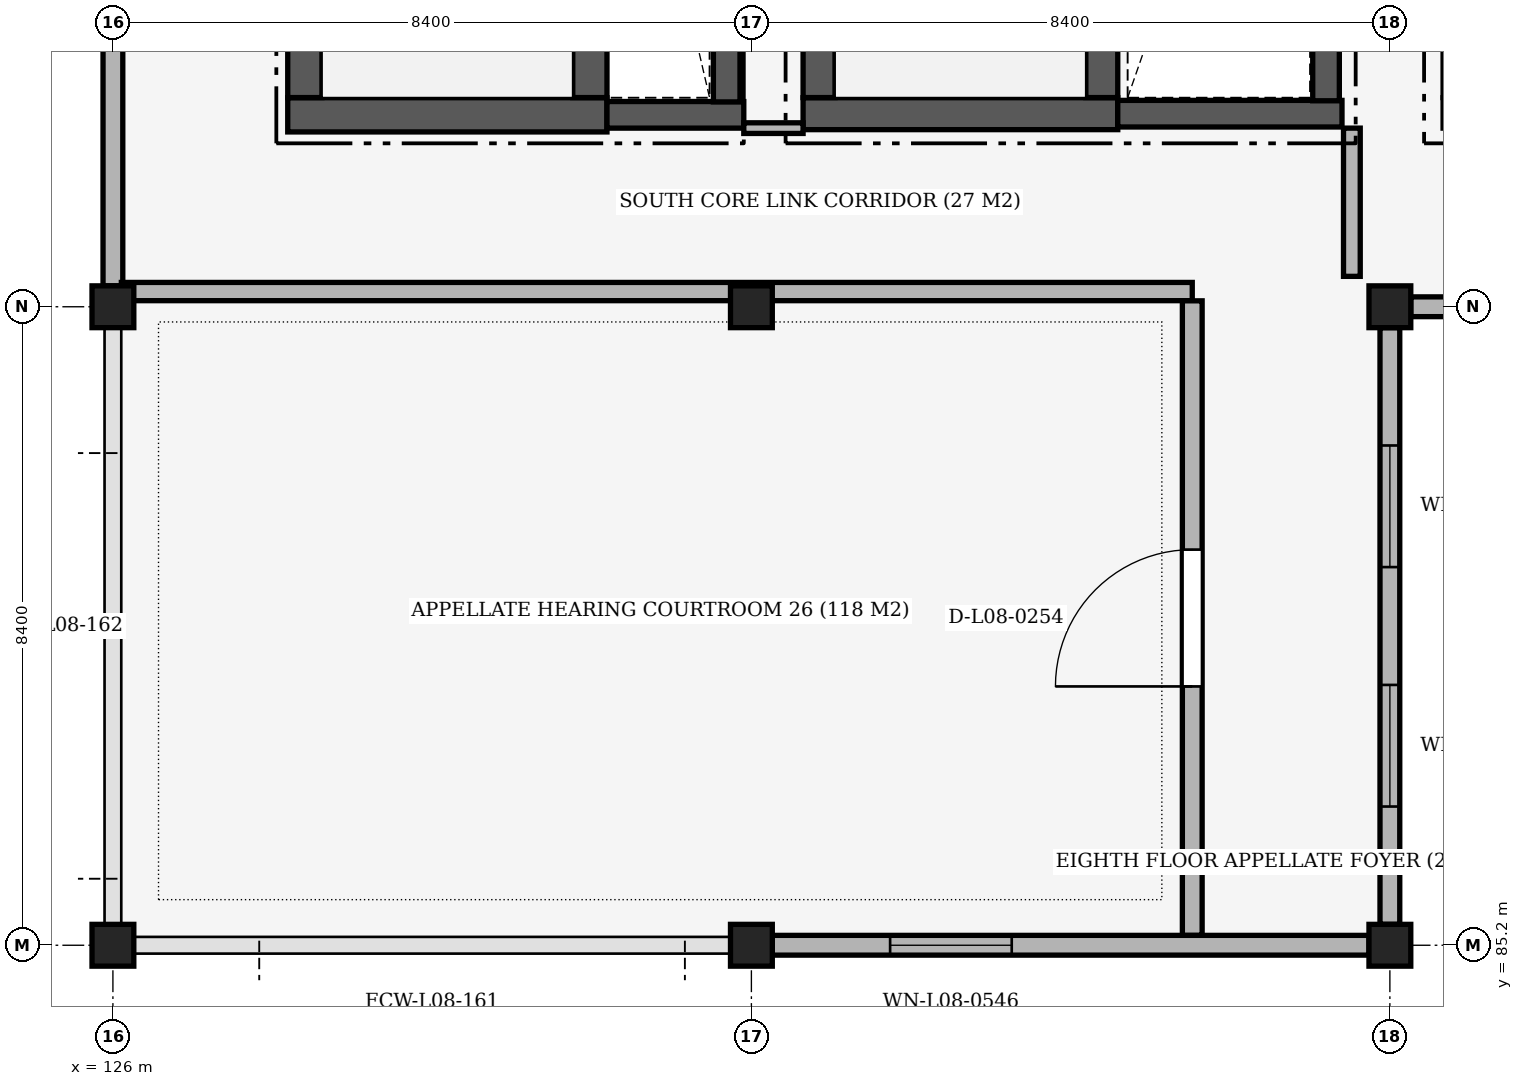
"""IFC4 building model, lengths in metres.
Left out: names, types, materials, properties, quantities, classifications, styles, units other than length and angle.
Written with IfcOpenShell. Run it as: python <this file> out.ifc"""

import sys

from ifc_helpers import new_model, si_unit, direction, frame, frame_2d, origin, origin_2d, place, context, subcontext, project, spatial, rectangle, extrude, element, fill, save


model = new_model("IFC4")
c1 = context("Model", 3, precision=1e-05, world=origin(), true_north=direction((0.0, 1.0)))
c2 = subcontext(c1, "Body", "Model", "MODEL_VIEW")
j1 = project(units=[si_unit("LENGTHUNIT", "METRE"), si_unit("PLANEANGLEUNIT", "RADIAN")], contexts=[c1])
p1 = place(None, origin())
s1 = spatial("IfcSite", under=j1, at=p1, CompositionType="ELEMENT")
p2 = place(p1, origin())
s2 = spatial("IfcBuilding", under=s1, at=p2, CompositionType="ELEMENT")
p3 = place(p2, frame((0.0, 0.0, 37.8)))
s3 = spatial("IfcBuildingStorey", under=s2, at=p3, CompositionType="ELEMENT", Elevation=37.8)
for number, where, z_axis, x_axis in (
    (1, (126.0, 85.2, 0.0), (0.0, 0.0, 1.0), (1.0, 0.0, 0.0)),
    (2, (126.0, 93.6, 0.0), (0.0, 0.0, 1.0), (1.0, 0.0, 0.0)),
    (3, (134.4, 85.2, 0.0), (0.0, 0.0, 1.0), (1.0, 0.0, 0.0)),
    (4, (134.4, 93.6, 0.0), (0.0, 0.0, 1.0), (1.0, 0.0, 0.0)),
    (5, (142.8, 85.2, 0.0), (0.0, 0.0, 1.0), (1.0, 0.0, 0.0)),
    (6, (142.8, 93.6, 0.0), (0.0, 0.0, 1.0), (1.0, 0.0, 0.0)),
):
    element("IfcColumn", number, at=place(p3, frame(where, z_axis=z_axis, x_axis=x_axis)), inside=s3, PredefinedType="COLUMN", context=c2, shape_type="SweptSolid", body=[
        extrude(rectangle(XDim=0.55, YDim=0.55, at=origin_2d()), origin(), (0.0, 0.0, 1.0), 4.2),
    ])
p4 = place(p3, frame((142.525, 85.2, 0.0), z_axis=(0.0, 0.0, 1.0), x_axis=(-1.0, 0.0, 0.0)))
e7 = element("IfcWall", 7, at=p4, inside=s3, PredefinedType="SOLIDWALL", context=c2, shape_type="SweptSolid", body=[
    extrude(rectangle(XDim=7.85, YDim=0.26, at=frame_2d((3.925, 0.0))), origin(), (0.0, 0.0, 1.0), 3.26),
])
p5 = place(p4, frame((4.7, 0.0, 1.05)))
e8 = element("IfcOpeningElement", 8, at=p5, cuts=e7, PredefinedType="OPENING", context=c2, shape_type="SweptSolid", body=[
    extrude(rectangle(XDim=1.6, YDim=1.8, at=frame_2d((0.8, 0.9))), frame((0.0, 0.145, 0.0), z_axis=(0.0, -1.0, 0.0), x_axis=(1.0, 0.0, 0.0)), (0.0, 0.0, 1.0), 0.29),
])
p6 = place(p3, frame((126.0, 93.875, 0.0), z_axis=(0.0, 0.0, 1.0), x_axis=(0.0, 1.0, 0.0)))
e9 = element("IfcWall", 9, at=p6, inside=s3, PredefinedType="SOLIDWALL", context=c2, shape_type="SweptSolid", body=[
    extrude(rectangle(XDim=5.425, YDim=0.26, at=frame_2d((2.712, 0.0))), origin(), (0.0, 0.0, 1.0), 3.41),
])
p7 = place(p3, frame((150.925, 93.6, 0.0), z_axis=(0.0, 0.0, 1.0), x_axis=(-1.0, 0.0, 0.0)))
e10 = element("IfcWall", 10, at=p7, inside=s3, PredefinedType="SOLIDWALL", context=c2, shape_type="SweptSolid", body=[
    extrude(rectangle(XDim=7.85, YDim=0.26, at=frame_2d((3.925, 0.0))), origin(), (0.0, 0.0, 1.0), 3.26),
])
p8 = place(p7, frame((1.55, 0.0, 1.05)))
e11 = element("IfcOpeningElement", 11, at=p8, cuts=e10, PredefinedType="OPENING", context=c2, shape_type="SweptSolid", body=[
    extrude(rectangle(XDim=1.6, YDim=1.8, at=frame_2d((0.8, 0.9))), frame((0.0, 0.145, 0.0), z_axis=(0.0, -1.0, 0.0), x_axis=(1.0, 0.0, 0.0)), (0.0, 0.0, 1.0), 0.29),
])
p9 = place(p7, frame((4.7, 0.0, 1.05)))
e12 = element("IfcOpeningElement", 12, at=p9, cuts=e10, PredefinedType="OPENING", context=c2, shape_type="SweptSolid", body=[
    extrude(rectangle(XDim=1.6, YDim=1.8, at=frame_2d((0.8, 0.9))), frame((0.0, 0.145, 0.0), z_axis=(0.0, -1.0, 0.0), x_axis=(1.0, 0.0, 0.0)), (0.0, 0.0, 1.0), 0.29),
])
p10 = place(p3, frame((142.8, 93.325, 0.0), z_axis=(0.0, 0.0, 1.0), x_axis=(0.0, -1.0, 0.0)))
e13 = element("IfcWall", 13, at=p10, inside=s3, PredefinedType="SOLIDWALL", context=c2, shape_type="SweptSolid", body=[
    extrude(rectangle(XDim=7.85, YDim=0.26, at=frame_2d((3.925, 0.0))), origin(), (0.0, 0.0, 1.0), 3.26),
])
p11 = place(p10, frame((1.55, 0.0, 1.05)))
e14 = element("IfcOpeningElement", 14, at=p11, cuts=e13, PredefinedType="OPENING", context=c2, shape_type="SweptSolid", body=[
    extrude(rectangle(XDim=1.6, YDim=1.8, at=frame_2d((0.8, 0.9))), frame((0.0, 0.145, 0.0), z_axis=(0.0, -1.0, 0.0), x_axis=(1.0, 0.0, 0.0)), (0.0, 0.0, 1.0), 0.29),
])
p12 = place(p10, frame((4.7, 0.0, 1.05)))
e15 = element("IfcOpeningElement", 15, at=p12, cuts=e13, PredefinedType="OPENING", context=c2, shape_type="SweptSolid", body=[
    extrude(rectangle(XDim=1.6, YDim=1.8, at=frame_2d((0.8, 0.9))), frame((0.0, 0.145, 0.0), z_axis=(0.0, -1.0, 0.0), x_axis=(1.0, 0.0, 0.0)), (0.0, 0.0, 1.0), 0.29),
])
p13 = place(p3, frame((128.3, 96.125, 0.0), z_axis=(0.0, 0.0, 1.0), x_axis=(1.0, 0.0, 0.0)))
e16 = element("IfcWall", 16, at=p13, inside=s3, PredefinedType="SHEAR", context=c2, shape_type="SweptSolid", body=[
    extrude(rectangle(XDim=4.2, YDim=0.45, at=frame_2d((2.1, 0.0))), origin(), (0.0, 0.0, 1.0), 3.96),
])
for number, where, z_axis, x_axis in (
    (17, (128.525, 96.352, 0.0), (0.0, 0.0, 1.0), (0.0, 1.0, 0.0)),
    (18, (132.275, 96.352, 0.0), (0.0, 0.0, 1.0), (0.0, 1.0, 0.0)),
):
    element("IfcWall", number, at=place(p3, frame(where, z_axis=z_axis, x_axis=x_axis)), inside=s3, PredefinedType="SHEAR", context=c2, shape_type="SweptSolid", body=[
        extrude(rectangle(XDim=6.896, YDim=0.45, at=frame_2d((3.448, 0.0))), origin(), (0.0, 0.0, 1.0), 3.96),
    ])
p14 = place(p3, frame((132.5, 96.125, 0.0), z_axis=(0.0, 0.0, 1.0), x_axis=(1.0, 0.0, 0.0)))
e19 = element("IfcWall", 19, at=p14, inside=s3, PredefinedType="SHEAR", context=c2, shape_type="SweptSolid", body=[
    extrude(rectangle(XDim=1.8, YDim=0.35, at=frame_2d((0.9, 0.0))), origin(), (0.0, 0.0, 1.0), 3.96),
])
p15 = place(p3, frame((134.075, 96.295, 0.0), z_axis=(0.0, 0.0, 1.0), x_axis=(0.0, 1.0, 0.0)))
e20 = element("IfcWall", 20, at=p15, inside=s3, PredefinedType="SHEAR", context=c2, shape_type="SweptSolid", body=[
    extrude(rectangle(XDim=7.212, YDim=0.35, at=frame_2d((3.606, 0.0))), origin(), (0.0, 0.0, 1.0), 3.96),
])
p16 = place(p3, frame((135.08, 96.14, 0.0), z_axis=(0.0, 0.0, 1.0), x_axis=(1.0, 0.0, 0.0)))
e21 = element("IfcWall", 21, at=p16, inside=s3, PredefinedType="SHEAR", context=c2, shape_type="SweptSolid", body=[
    extrude(rectangle(XDim=4.14, YDim=0.42, at=frame_2d((2.07, 0.0))), origin(), (0.0, 0.0, 1.0), 3.96),
])
for number, where, z_axis, x_axis in (
    (22, (135.29, 96.352, 0.0), (0.0, 0.0, 1.0), (0.0, 1.0, 0.0)),
    (23, (139.01, 96.352, 0.0), (0.0, 0.0, 1.0), (0.0, 1.0, 0.0)),
):
    element("IfcWall", number, at=place(p3, frame(where, z_axis=z_axis, x_axis=x_axis)), inside=s3, PredefinedType="SHEAR", context=c2, shape_type="SweptSolid", body=[
        extrude(rectangle(XDim=6.896, YDim=0.42, at=frame_2d((3.448, 0.0))), origin(), (0.0, 0.0, 1.0), 3.96),
    ])
p17 = place(p3, frame((139.22, 96.14, 0.0), z_axis=(0.0, 0.0, 1.0), x_axis=(1.0, 0.0, 0.0)))
e24 = element("IfcWall", 24, at=p17, inside=s3, PredefinedType="SHEAR", context=c2, shape_type="SweptSolid", body=[
    extrude(rectangle(XDim=2.95, YDim=0.35, at=frame_2d((1.475, 0.0))), origin(), (0.0, 0.0, 1.0), 3.96),
])
p18 = place(p3, frame((141.96, 96.31, 0.0), z_axis=(0.0, 0.0, 1.0), x_axis=(0.0, 1.0, 0.0)))
e25 = element("IfcWall", 25, at=p18, inside=s3, PredefinedType="SHEAR", context=c2, shape_type="SweptSolid", body=[
    extrude(rectangle(XDim=7.197, YDim=0.35, at=frame_2d((3.599, 0.0))), origin(), (0.0, 0.0, 1.0), 3.96),
])
p19 = place(p3, frame((126.111, 93.8, 0.0), z_axis=(0.0, 0.0, 1.0), x_axis=(1.0, 0.0, 0.0)))
e26 = element("IfcWall", 26, at=p19, inside=s3, PredefinedType="PARTITIONING", context=c2, shape_type="SweptSolid", body=[
    extrude(rectangle(XDim=14.089, YDim=0.24, at=frame_2d((7.044, 0.0))), origin(), (0.0, 0.0, 1.0), 3.26),
])
p20 = place(p3, frame((134.3, 95.95, 0.0), z_axis=(0.0, 0.0, 1.0), x_axis=(1.0, 0.0, 0.0)))
e27 = element("IfcWall", 27, at=p20, inside=s3, PredefinedType="PARTITIONING", context=c2, shape_type="SweptSolid", body=[
    extrude(rectangle(XDim=0.78, YDim=0.14, at=frame_2d((0.39, 0.0))), origin(), (0.0, 0.0, 1.0), 3.41),
])
p21 = place(p3, frame((140.2, 85.332, 0.0), z_axis=(0.0, 0.0, 1.0), x_axis=(0.0, 1.0, 0.0)))
e28 = element("IfcWall", 28, at=p21, inside=s3, PredefinedType="PARTITIONING", context=c2, shape_type="SweptSolid", body=[
    extrude(rectangle(XDim=8.346, YDim=0.26, at=frame_2d((4.173, 0.0))), origin(), (0.0, 0.0, 1.0), 3.26),
])
p22 = place(p21, frame((3.273, 0.0, 0.0)))
e29 = element("IfcOpeningElement", 29, at=p22, cuts=e28, PredefinedType="OPENING", context=c2, shape_type="SweptSolid", body=[
    extrude(rectangle(XDim=1.8, YDim=2.4, at=frame_2d((0.9, 1.2))), frame((0.0, 0.145, 0.0), z_axis=(0.0, -1.0, 0.0), x_axis=(1.0, 0.0, 0.0)), (0.0, 0.0, 1.0), 0.29),
])
p23 = place(p3, frame((142.3, 94.0, 0.0), z_axis=(0.0, 0.0, 1.0), x_axis=(0.0, 1.0, 0.0)))
e30 = element("IfcWall", 30, at=p23, inside=s3, PredefinedType="PARTITIONING", context=c2, shape_type="SweptSolid", body=[
    extrude(rectangle(XDim=1.95, YDim=0.22, at=frame_2d((0.975, 0.0))), origin(), (0.0, 0.0, 1.0), 3.96),
])
p24 = place(p5, origin())
e31 = element("IfcWindow", 31, at=p24, inside=s3, PartitioningType="SINGLE_PANEL", PredefinedType="WINDOW", context=c2, shape_type="SweptSolid", body=[
    extrude(rectangle(XDim=1.6, YDim=1.8, at=frame_2d((0.8, 0.9))), frame((0.0, 0.03, 0.0), z_axis=(0.0, -1.0, 0.0), x_axis=(1.0, 0.0, 0.0)), (0.0, 0.0, 1.0), 0.06),
])
fill(e8, e31)
p25 = place(p11, origin())
e32 = element("IfcWindow", 32, at=p25, inside=s3, PartitioningType="SINGLE_PANEL", PredefinedType="WINDOW", context=c2, shape_type="SweptSolid", body=[
    extrude(rectangle(XDim=1.6, YDim=1.8, at=frame_2d((0.8, 0.9))), frame((0.0, 0.03, 0.0), z_axis=(0.0, -1.0, 0.0), x_axis=(1.0, 0.0, 0.0)), (0.0, 0.0, 1.0), 0.06),
])
fill(e14, e32)
p26 = place(p12, origin())
e33 = element("IfcWindow", 33, at=p26, inside=s3, PartitioningType="SINGLE_PANEL", PredefinedType="WINDOW", context=c2, shape_type="SweptSolid", body=[
    extrude(rectangle(XDim=1.6, YDim=1.8, at=frame_2d((0.8, 0.9))), frame((0.0, 0.03, 0.0), z_axis=(0.0, -1.0, 0.0), x_axis=(1.0, 0.0, 0.0)), (0.0, 0.0, 1.0), 0.06),
])
fill(e15, e33)
p27 = place(p22, origin())
e34 = element("IfcDoor", 34, at=p27, inside=s3, OperationType="SINGLE_SWING_LEFT", PredefinedType="DOOR", context=c2, shape_type="SweptSolid", body=[
    extrude(rectangle(XDim=1.8, YDim=2.4, at=frame_2d((0.9, 1.2))), frame((0.0, 0.025, 0.0), z_axis=(0.0, -1.0, 0.0), x_axis=(1.0, 0.0, 0.0)), (0.0, 0.0, 1.0), 0.05),
])
fill(e29, e34)
save(model, sys.argv[1])
